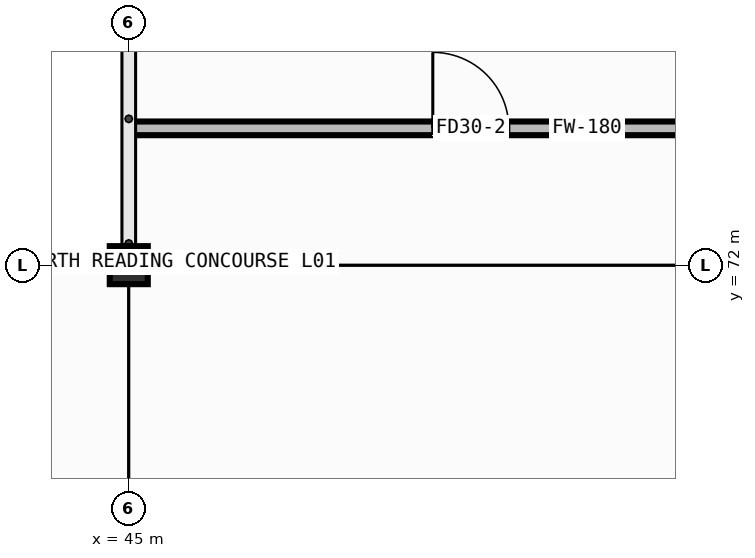
"""IFC4 building model, lengths in metres.
Left out: names, types, materials, properties, quantities, classifications, styles, units other than length and angle.
Written with IfcOpenShell. Run it as: python <this file> out.ifc"""

import sys

from ifc_helpers import new_model, si_unit, direction, frame, frame_2d, origin, origin_2d, place, context, subcontext, project, spatial, rectangle, hollow_rectangle, extrude, element, fill, save


model = new_model("IFC4")
c1 = context("Model", 3, precision=1e-05, world=origin(), true_north=direction((0.0, 1.0)))
c2 = subcontext(c1, "Body", "Model", "MODEL_VIEW")
j1 = project(units=[si_unit("LENGTHUNIT", "METRE"), si_unit("PLANEANGLEUNIT", "RADIAN")], contexts=[c1])
p1 = place(None, origin())
s1 = spatial("IfcSite", under=j1, at=p1, CompositionType="ELEMENT")
p2 = place(p1, origin())
s2 = spatial("IfcBuilding", under=s1, at=p2, CompositionType="ELEMENT")
p3 = place(p2, origin())
s3 = spatial("IfcBuildingStorey", under=s2, at=p3, CompositionType="ELEMENT", Elevation=0.0)
p4 = place(p3, frame((45.0, 72.0, 0.0), z_axis=(0.0, 0.0, 1.0), x_axis=(1.0, 0.0, 0.0)))
e1 = element("IfcColumn", 1, at=p4, inside=s3, PredefinedType="COLUMN", context=c2, shape_type="SweptSolid", body=[
    extrude(hollow_rectangle(XDim=0.5, YDim=0.5, WallThickness=0.022, at=origin_2d()), origin(), (0.0, 0.0, 1.0), 4.8),
])
p5 = place(p3, frame((45.035, 73.8, 0.0), z_axis=(0.0, 0.0, 1.0), x_axis=(1.0, 0.0, 0.0)))
e2 = element("IfcWall", 2, at=p5, inside=s3, PredefinedType="PARTITIONING", context=c2, shape_type="SweptSolid", body=[
    extrude(rectangle(XDim=9.365, YDim=0.18, at=frame_2d((4.683, 0.0))), origin(), (0.0, 0.0, 1.0), 4.555),
])
p6 = place(p5, frame((3.965, 0.0, 0.0)))
e3 = element("IfcOpeningElement", 3, at=p6, cuts=e2, PredefinedType="OPENING", context=c2, shape_type="SweptSolid", body=[
    extrude(rectangle(XDim=1.0, YDim=2.08, at=frame_2d((0.5, 1.04))), frame((0.0, 0.102, 0.0), z_axis=(0.0, -1.0, 0.0), x_axis=(1.0, 0.0, 0.0)), (0.0, 0.0, 1.0), 0.204),
])
p7 = place(p6, origin())
e4 = element("IfcDoor", 4, at=p7, inside=s3, OperationType="SINGLE_SWING_LEFT", PredefinedType="DOOR", context=c2, shape_type="SweptSolid", body=[
    extrude(rectangle(XDim=1.0, YDim=2.08, at=frame_2d((0.5, 1.04))), frame((0.0, 0.025, 0.0), z_axis=(0.0, -1.0, 0.0), x_axis=(1.0, 0.0, 0.0)), (0.0, 0.0, 1.0), 0.05),
])
fill(e3, e4)
save(model, sys.argv[1])
